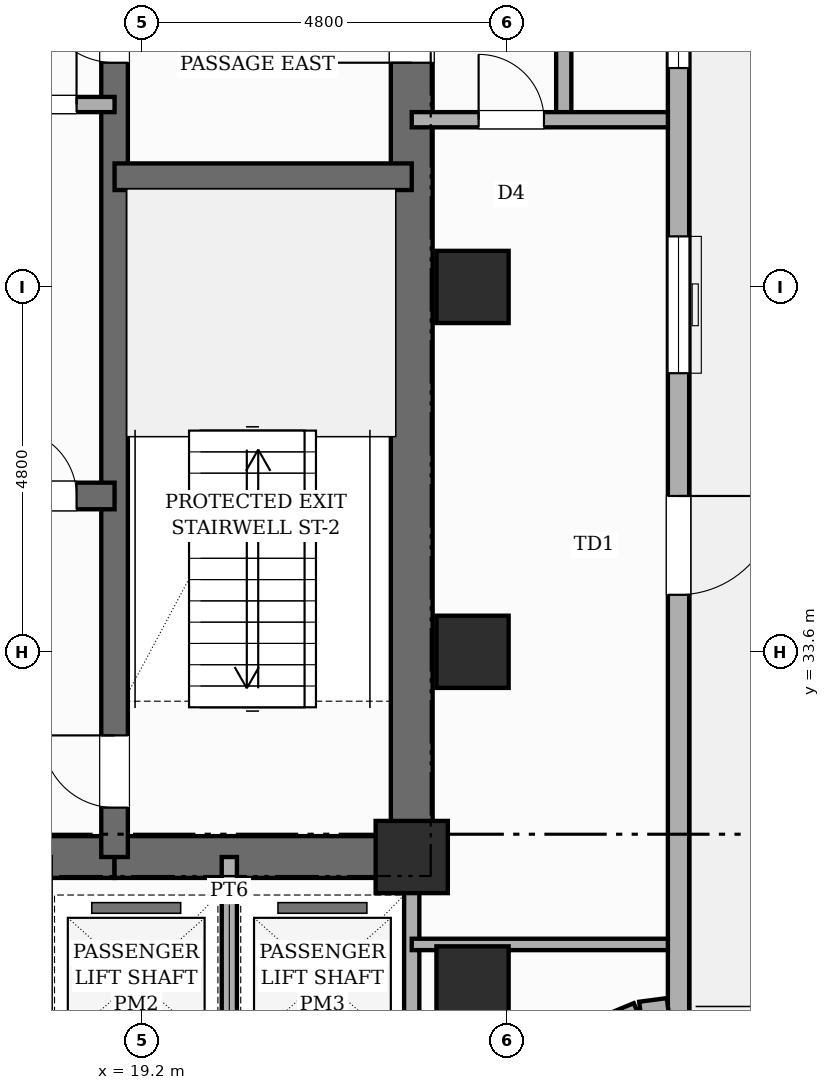
"""IFC4 building model, lengths in metres.
Left out: names, types, materials, properties, quantities, classifications, styles, units other than length and angle.
Written with IfcOpenShell. Run it as: python <this file> out.ifc"""

import sys

from ifc_helpers import new_model, si_unit, direction, frame, frame_2d, origin, origin_2d, place, context, subcontext, project, spatial, rectangle, extrude, element, fill, save


model = new_model("IFC4")
c1 = context("Model", 3, precision=1e-05, world=origin(), true_north=direction((0.0, 1.0)))
c2 = subcontext(c1, "Body", "Model", "MODEL_VIEW")
j1 = project(units=[si_unit("LENGTHUNIT", "METRE"), si_unit("PLANEANGLEUNIT", "RADIAN")], contexts=[c1])
p1 = place(None, origin())
s1 = spatial("IfcSite", under=j1, at=p1, CompositionType="ELEMENT")
p2 = place(p1, origin())
s2 = spatial("IfcBuilding", under=s1, at=p2, CompositionType="ELEMENT")
p3 = place(p2, frame((0.0, 0.0, 193.6)))
s3 = spatial("IfcBuildingStorey", under=s2, at=p3, CompositionType="ELEMENT", Elevation=193.6)
p4 = place(p3, frame((22.75, 30.625, 0.0), z_axis=(0.0, 0.0, 1.0), x_axis=(0.0, 1.0, 0.0)))
e1 = element("IfcWall", 1, at=p4, inside=s3, PredefinedType="SHEAR", context=c2, shape_type="SweptSolid", body=[
    extrude(rectangle(XDim=15.45, YDim=0.55, at=frame_2d((7.725, 0.0))), origin(), (0.0, 0.0, 1.0), 4.8),
])
p5 = place(p4, frame((10.725, 0.0, 0.0)))
e2 = element("IfcOpeningElement", 2, at=p5, cuts=e1, PredefinedType="OPENING", context=c2, shape_type="SweptSolid", body=[
    extrude(rectangle(XDim=1.0, YDim=2.15, at=frame_2d((0.5, 1.075))), frame((0.0, 0.285, 0.0), z_axis=(0.0, -1.0, 0.0), x_axis=(1.0, 0.0, 0.0)), (0.0, 0.0, 1.0), 0.57),
])
p6 = place(p3, frame((9.96, 30.9, 0.0), z_axis=(0.0, 0.0, 1.0), x_axis=(1.0, 0.0, 0.0)))
e3 = element("IfcWall", 3, at=p6, inside=s3, PredefinedType="SHEAR", context=c2, shape_type="SweptSolid", body=[
    extrude(rectangle(XDim=8.88, YDim=0.55, at=frame_2d((4.44, 0.0))), origin(), (0.0, 0.0, 1.0), 4.8),
])
p7 = place(p6, frame((4.09, 0.0, 0.0)))
e4 = element("IfcOpeningElement", 4, at=p7, cuts=e3, PredefinedType="OPENING", context=c2, shape_type="SweptSolid", body=[
    extrude(rectangle(XDim=1.0, YDim=2.15, at=frame_2d((0.5, 1.075))), frame((0.0, 0.285, 0.0), z_axis=(0.0, -1.0, 0.0), x_axis=(1.0, 0.0, 0.0)), (0.0, 0.0, 1.0), 0.57),
])
p8 = place(p3, frame((18.84, 30.9, 0.0), z_axis=(0.0, 0.0, 1.0), x_axis=(1.0, 0.0, 0.0)))
e5 = element("IfcWall", 5, at=p8, inside=s3, PredefinedType="SHEAR", context=c2, shape_type="SweptSolid", body=[
    extrude(rectangle(XDim=3.91, YDim=0.55, at=frame_2d((1.955, 0.0))), origin(), (0.0, 0.0, 1.0), 4.8),
])
p9 = place(p3, frame((18.84, 30.9, 0.0), z_axis=(0.0, 0.0, 1.0), x_axis=(0.0, 1.0, 0.0)))
e6 = element("IfcWall", 6, at=p9, inside=s3, PredefinedType="SHEAR", context=c2, shape_type="SweptSolid", body=[
    extrude(rectangle(XDim=14.9, YDim=0.35, at=frame_2d((7.45, 0.0))), origin(), (0.0, 0.0, 1.0), 4.8),
])
p10 = place(p9, frame((0.65, 0.0, 0.0)))
e7 = element("IfcOpeningElement", 7, at=p10, cuts=e6, PredefinedType="OPENING", context=c2, shape_type="SweptSolid", body=[
    extrude(rectangle(XDim=0.95, YDim=2.1, at=frame_2d((0.475, 1.05))), frame((0.0, 0.185, 0.0), z_axis=(0.0, -1.0, 0.0), x_axis=(1.0, 0.0, 0.0)), (0.0, 0.0, 1.0), 0.37),
])
p11 = place(p9, frame((10.45, 0.0, 0.0)))
e8 = element("IfcOpeningElement", 8, at=p11, cuts=e6, PredefinedType="OPENING", context=c2, shape_type="SweptSolid", body=[
    extrude(rectangle(XDim=1.0, YDim=2.15, at=frame_2d((0.5, 1.075))), frame((0.0, 0.185, 0.0), z_axis=(0.0, -1.0, 0.0), x_axis=(1.0, 0.0, 0.0)), (0.0, 0.0, 1.0), 0.37),
])
p12 = place(p3, frame((18.84, 39.85, 0.0), z_axis=(0.0, 0.0, 1.0), x_axis=(1.0, 0.0, 0.0)))
e9 = element("IfcWall", 9, at=p12, inside=s3, PredefinedType="SHEAR", context=c2, shape_type="SweptSolid", body=[
    extrude(rectangle(XDim=3.91, YDim=0.35, at=frame_2d((1.955, 0.0))), origin(), (0.0, 0.0, 1.0), 4.8),
])
p13 = place(p3, frame((9.96, 35.65, 0.0), z_axis=(0.0, 0.0, 1.0), x_axis=(1.0, 0.0, 0.0)))
e10 = element("IfcWall", 10, at=p13, inside=s3, PredefinedType="SHEAR", context=c2, shape_type="SweptSolid", body=[
    extrude(rectangle(XDim=8.88, YDim=0.35, at=frame_2d((4.44, 0.0))), origin(), (0.0, 0.0, 1.0), 4.8),
])
p14 = place(p13, frame((0.84, 0.0, 0.0)))
e11 = element("IfcOpeningElement", 11, at=p14, cuts=e10, PredefinedType="OPENING", context=c2, shape_type="SweptSolid", body=[
    extrude(rectangle(XDim=1.1, YDim=2.15, at=frame_2d((0.55, 1.075))), frame((0.0, 0.185, 0.0), z_axis=(0.0, -1.0, 0.0), x_axis=(1.0, 0.0, 0.0)), (0.0, 0.0, 1.0), 0.37),
])
p15 = place(p13, frame((5.24, 0.0, 0.0)))
e12 = element("IfcOpeningElement", 12, at=p15, cuts=e10, PredefinedType="OPENING", context=c2, shape_type="SweptSolid", body=[
    extrude(rectangle(XDim=1.1, YDim=2.15, at=frame_2d((0.55, 1.075))), frame((0.0, 0.185, 0.0), z_axis=(0.0, -1.0, 0.0), x_axis=(1.0, 0.0, 0.0)), (0.0, 0.0, 1.0), 0.37),
])
p16 = place(p13, frame((7.5, 0.0, 0.0)))
e13 = element("IfcOpeningElement", 13, at=p16, cuts=e10, PredefinedType="OPENING", context=c2, shape_type="SweptSolid", body=[
    extrude(rectangle(XDim=0.88, YDim=2.1, at=frame_2d((0.44, 1.05))), frame((0.0, 0.185, 0.0), z_axis=(0.0, -1.0, 0.0), x_axis=(1.0, 0.0, 0.0)), (0.0, 0.0, 1.0), 0.37),
])
for number, where, z_axis, x_axis in (
    (14, (22.75, 30.9, 0.0), (0.0, 0.0, 1.0), (1.0, 0.0, 0.0)),
    (15, (23.55, 29.25, 0.0), (0.0, 0.0, 1.0), (1.0, 0.0, 0.0)),
    (16, (23.55, 33.6, 0.0), (0.0, 0.0, 1.0), (1.0, 0.0, 0.0)),
    (17, (23.55, 38.4, 0.0), (0.0, 0.0, 1.0), (1.0, 0.0, 0.0)),
):
    element("IfcColumn", number, at=place(p3, frame(where, z_axis=z_axis, x_axis=x_axis)), inside=s3, PredefinedType="COLUMN", context=c2, shape_type="SweptSolid", body=[
        extrude(rectangle(XDim=0.95, YDim=0.95, at=origin_2d()), origin(), (0.0, 0.0, 1.0), 4.8),
    ])
p17 = place(p3, frame((26.26, 43.8, 0.0), z_axis=(0.0, 0.0, 1.0), x_axis=(0.0, -1.0, 0.0)))
e18 = element("IfcWall", 18, at=p17, inside=s3, PredefinedType="STANDARD", context=c2, shape_type="SweptSolid", body=[
    extrude(rectangle(XDim=15.0, YDim=0.28, at=frame_2d((7.5, 0.0))), origin(), (0.0, 0.0, 1.0), 4.5),
])
p18 = place(p17, frame((8.15, 0.0, 0.0)))
e19 = element("IfcOpeningElement", 19, at=p18, cuts=e18, PredefinedType="OPENING", context=c2, shape_type="SweptSolid", body=[
    extrude(rectangle(XDim=1.3, YDim=2.2, at=frame_2d((0.65, 1.1))), frame((0.0, 0.15, 0.0), z_axis=(0.0, -1.0, 0.0), x_axis=(1.0, 0.0, 0.0)), (0.0, 0.0, 1.0), 0.3),
])
p19 = place(p17, frame((0.72, 0.0, 0.8)))
e20 = element("IfcOpeningElement", 20, at=p19, cuts=e18, PredefinedType="OPENING", context=c2, shape_type="SweptSolid", body=[
    extrude(rectangle(XDim=1.8, YDim=2.1, at=frame_2d((0.9, 1.05))), frame((0.0, 0.15, 0.0), z_axis=(0.0, -1.0, 0.0), x_axis=(1.0, 0.0, 0.0)), (0.0, 0.0, 1.0), 0.3),
])
p20 = place(p17, frame((4.735, 0.0, 0.8)))
e21 = element("IfcOpeningElement", 21, at=p20, cuts=e18, PredefinedType="OPENING", context=c2, shape_type="SweptSolid", body=[
    extrude(rectangle(XDim=1.8, YDim=2.1, at=frame_2d((0.9, 1.05))), frame((0.0, 0.15, 0.0), z_axis=(0.0, -1.0, 0.0), x_axis=(1.0, 0.0, 0.0)), (0.0, 0.0, 1.0), 0.3),
])
p21 = place(p3, frame((26.124, 28.905, 0.0), z_axis=(0.0, 0.0, 1.0), x_axis=(-0.991436143334, -0.130592395224, 0.0)))
e22 = element("IfcWall", 22, at=p21, inside=s3, PredefinedType="STANDARD", context=c2, shape_type="SweptSolid", body=[
    extrude(rectangle(XDim=0.366, YDim=0.28, at=frame_2d((0.183, 0.0))), origin(), (0.0, 0.0, 1.0), 2.98),
])
p22 = place(p3, frame((25.725, 28.847, 0.0), z_axis=(0.0, 0.0, 1.0), x_axis=(-0.923974080304, -0.382455093999, 0.0)))
e23 = element("IfcWall", 23, at=p22, inside=s3, PredefinedType="STANDARD", context=c2, shape_type="SweptSolid", body=[
    extrude(rectangle(XDim=0.626, YDim=0.28, at=frame_2d((0.313, 0.0))), origin(), (0.0, 0.0, 1.0), 2.98),
])
p23 = place(p3, frame((9.96, 40.8, 0.0), z_axis=(0.0, 0.0, 1.0), x_axis=(1.0, 0.0, 0.0)))
e24 = element("IfcWall", 24, at=p23, inside=s3, PredefinedType="POLYGONAL", context=c2, shape_type="SweptSolid", body=[
    extrude(rectangle(XDim=8.88, YDim=0.2, at=frame_2d((4.44, 0.0))), origin(), (0.0, 0.0, 1.0), 4.5),
])
p24 = place(p23, frame((7.5, 0.0, 0.0)))
e25 = element("IfcOpeningElement", 25, at=p24, cuts=e24, PredefinedType="OPENING", context=c2, shape_type="SweptSolid", body=[
    extrude(rectangle(XDim=0.88, YDim=2.1, at=frame_2d((0.44, 1.05))), frame((0.0, 0.11, 0.0), z_axis=(0.0, -1.0, 0.0), x_axis=(1.0, 0.0, 0.0)), (0.0, 0.0, 1.0), 0.22),
])
p25 = place(p23, frame((3.6, 0.0, 0.0)))
e26 = element("IfcOpeningElement", 26, at=p25, cuts=e24, PredefinedType="OPENING", context=c2, shape_type="SweptSolid", body=[
    extrude(rectangle(XDim=0.88, YDim=2.1, at=frame_2d((0.44, 1.05))), frame((0.0, 0.11, 0.0), z_axis=(0.0, -1.0, 0.0), x_axis=(1.0, 0.0, 0.0)), (0.0, 0.0, 1.0), 0.22),
])
p26 = place(p3, frame((22.75, 27.9, 0.0), z_axis=(0.0, 0.0, 1.0), x_axis=(0.0, 1.0, 0.0)))
e27 = element("IfcWall", 27, at=p26, inside=s3, PredefinedType="POLYGONAL", context=c2, shape_type="SweptSolid", body=[
    extrude(rectangle(XDim=3.0, YDim=0.2, at=frame_2d((1.5, 0.0))), origin(), (0.0, 0.0, 1.0), 4.5),
])
p27 = place(p3, frame((20.35, 28.0, 0.0), z_axis=(0.0, 0.0, 1.0), x_axis=(0.0, 1.0, 0.0)))
e28 = element("IfcWall", 28, at=p27, inside=s3, PredefinedType="POLYGONAL", context=c2, shape_type="SweptSolid", body=[
    extrude(rectangle(XDim=2.9, YDim=0.2, at=frame_2d((1.45, 0.0))), origin(), (0.0, 0.0, 1.0), 4.5),
])
p28 = place(p3, frame((24.75, 40.6, 0.0), z_axis=(0.0, 0.0, 1.0), x_axis=(0.0, 1.0, 0.0)))
e29 = element("IfcWall", 29, at=p28, inside=s3, PredefinedType="PARTITIONING", context=c2, shape_type="SweptSolid", body=[
    extrude(rectangle(XDim=4.2, YDim=0.2, at=frame_2d((2.1, 0.0))), origin(), (0.0, 0.0, 1.0), 4.5),
])
p29 = place(p28, frame((1.0, 0.0, 0.0)))
e30 = element("IfcOpeningElement", 30, at=p29, cuts=e29, PredefinedType="OPENING", context=c2, shape_type="SweptSolid", body=[
    extrude(rectangle(XDim=0.88, YDim=2.1, at=frame_2d((0.44, 1.05))), frame((0.0, 0.11, 0.0), z_axis=(0.0, -1.0, 0.0), x_axis=(1.0, 0.0, 0.0)), (0.0, 0.0, 1.0), 0.22),
])
p30 = place(p3, frame((22.75, 40.6, 0.0), z_axis=(0.0, 0.0, 1.0), x_axis=(1.0, 0.0, 0.0)))
e31 = element("IfcWall", 31, at=p30, inside=s3, PredefinedType="PARTITIONING", context=c2, shape_type="SweptSolid", body=[
    extrude(rectangle(XDim=3.37, YDim=0.2, at=frame_2d((1.685, 0.0))), origin(), (0.0, 0.0, 1.0), 4.5),
])
p31 = place(p30, frame((0.88, 0.0, 0.0)))
e32 = element("IfcOpeningElement", 32, at=p31, cuts=e31, PredefinedType="OPENING", context=c2, shape_type="SweptSolid", body=[
    extrude(rectangle(XDim=0.86, YDim=2.1, at=frame_2d((0.43, 1.05))), frame((0.0, 0.11, 0.0), z_axis=(0.0, -1.0, 0.0), x_axis=(1.0, 0.0, 0.0)), (0.0, 0.0, 1.0), 0.22),
])
p32 = place(p3, frame((22.75, 29.75, 0.0), z_axis=(0.0, 0.0, 1.0), x_axis=(1.0, 0.0, 0.0)))
e33 = element("IfcWall", 33, at=p32, inside=s3, PredefinedType="PARTITIONING", context=c2, shape_type="SweptSolid", body=[
    extrude(rectangle(XDim=3.37, YDim=0.15, at=frame_2d((1.685, 0.0))), origin(), (0.0, 0.0, 1.0), 2.98),
])
p33 = place(p18, origin())
e34 = element("IfcDoor", 34, at=p33, inside=s3, OperationType="SINGLE_SWING_LEFT", PredefinedType="DOOR", context=c2, shape_type="SweptSolid", body=[
    extrude(rectangle(XDim=1.3, YDim=2.2, at=frame_2d((0.65, 1.1))), frame((0.0, 0.025, 0.0), z_axis=(0.0, -1.0, 0.0), x_axis=(1.0, 0.0, 0.0)), (0.0, 0.0, 1.0), 0.05),
])
fill(e19, e34)
p34 = place(p19, origin())
e35 = element("IfcWindow", 35, at=p34, inside=s3, PartitioningType="SINGLE_PANEL", PredefinedType="WINDOW", context=c2, shape_type="SweptSolid", body=[
    extrude(rectangle(XDim=1.8, YDim=2.1, at=frame_2d((0.9, 1.05))), frame((0.0, 0.03, 0.0), z_axis=(0.0, -1.0, 0.0), x_axis=(1.0, 0.0, 0.0)), (0.0, 0.0, 1.0), 0.06),
])
fill(e20, e35)
p35 = place(p20, origin())
e36 = element("IfcWindow", 36, at=p35, inside=s3, PartitioningType="SINGLE_PANEL", PredefinedType="WINDOW", context=c2, shape_type="SweptSolid", body=[
    extrude(rectangle(XDim=1.8, YDim=2.1, at=frame_2d((0.9, 1.05))), frame((0.0, 0.03, 0.0), z_axis=(0.0, -1.0, 0.0), x_axis=(1.0, 0.0, 0.0)), (0.0, 0.0, 1.0), 0.06),
])
fill(e21, e36)
p36 = place(p10, origin())
e37 = element("IfcDoor", 37, at=p36, inside=s3, OperationType="SINGLE_SWING_RIGHT", PredefinedType="DOOR", context=c2, shape_type="SweptSolid", body=[
    extrude(rectangle(XDim=0.95, YDim=2.1, at=frame_2d((0.475, 1.05))), frame((0.0, 0.025, 0.0), z_axis=(0.0, -1.0, 0.0), x_axis=(1.0, 0.0, 0.0)), (0.0, 0.0, 1.0), 0.05),
])
fill(e7, e37)
p37 = place(p16, origin())
e38 = element("IfcDoor", 38, at=p37, inside=s3, OperationType="SINGLE_SWING_LEFT", PredefinedType="DOOR", context=c2, shape_type="SweptSolid", body=[
    extrude(rectangle(XDim=0.88, YDim=2.1, at=frame_2d((0.44, 1.05))), frame((0.0, 0.025, 0.0), z_axis=(0.0, -1.0, 0.0), x_axis=(1.0, 0.0, 0.0)), (0.0, 0.0, 1.0), 0.05),
])
fill(e13, e38)
p38 = place(p24, origin())
e39 = element("IfcDoor", 39, at=p38, inside=s3, OperationType="SINGLE_SWING_RIGHT", PredefinedType="DOOR", context=c2, shape_type="SweptSolid", body=[
    extrude(rectangle(XDim=0.88, YDim=2.1, at=frame_2d((0.44, 1.05))), frame((0.0, 0.025, 0.0), z_axis=(0.0, -1.0, 0.0), x_axis=(1.0, 0.0, 0.0)), (0.0, 0.0, 1.0), 0.05),
])
fill(e25, e39)
p39 = place(p11, origin())
e40 = element("IfcDoor", 40, at=p39, inside=s3, OperationType="SINGLE_SWING_RIGHT", PredefinedType="DOOR", context=c2, shape_type="SweptSolid", body=[
    extrude(rectangle(XDim=1.0, YDim=2.15, at=frame_2d((0.5, 1.075))), frame((0.0, 0.025, 0.0), z_axis=(0.0, -1.0, 0.0), x_axis=(1.0, 0.0, 0.0)), (0.0, 0.0, 1.0), 0.05),
])
fill(e8, e40)
p40 = place(p5, origin())
e41 = element("IfcDoor", 41, at=p40, inside=s3, OperationType="SINGLE_SWING_LEFT", PredefinedType="DOOR", context=c2, shape_type="SweptSolid", body=[
    extrude(rectangle(XDim=1.0, YDim=2.15, at=frame_2d((0.5, 1.075))), frame((0.0, 0.025, 0.0), z_axis=(0.0, -1.0, 0.0), x_axis=(1.0, 0.0, 0.0)), (0.0, 0.0, 1.0), 0.05),
])
fill(e2, e41)
p41 = place(p31, origin())
e42 = element("IfcDoor", 42, at=p41, inside=s3, OperationType="SINGLE_SWING_LEFT", PredefinedType="DOOR", context=c2, shape_type="SweptSolid", body=[
    extrude(rectangle(XDim=0.86, YDim=2.1, at=frame_2d((0.43, 1.05))), frame((0.0, 0.025, 0.0), z_axis=(0.0, -1.0, 0.0), x_axis=(1.0, 0.0, 0.0)), (0.0, 0.0, 1.0), 0.05),
])
fill(e32, e42)
save(model, sys.argv[1])
